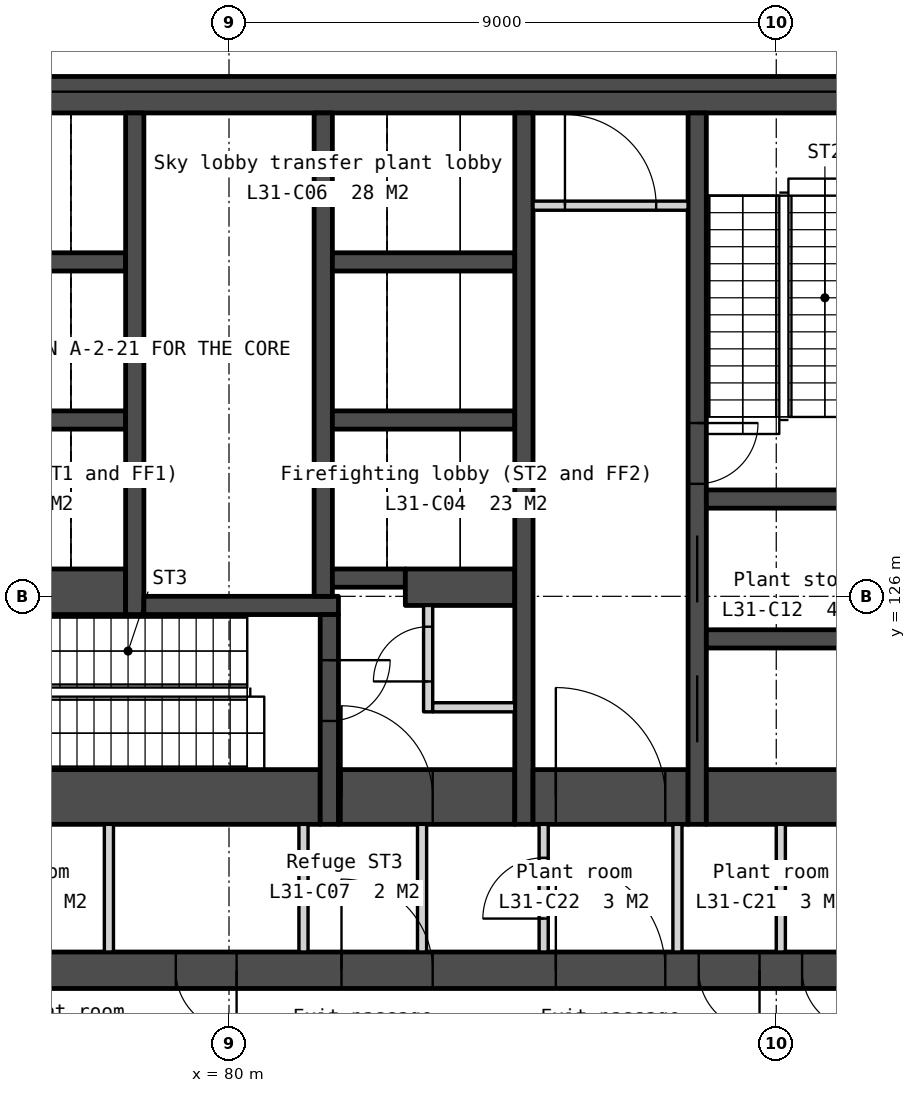
"""IFC4 building model, lengths in metres.
Left out: names, types, materials, properties, quantities, classifications, styles, units other than length and angle.
Written with IfcOpenShell. Run it as: python <this file> out.ifc"""

import sys

from ifc_helpers import new_model, si_unit, direction, frame, frame_2d, origin, place, context, subcontext, project, spatial, rectangle, extrude, element, fill, save


model = new_model("IFC4")
c1 = context("Model", 3, precision=1e-05, world=origin(), true_north=direction((0.0, 1.0)))
c2 = subcontext(c1, "Body", "Model", "MODEL_VIEW")
j1 = project(units=[si_unit("LENGTHUNIT", "METRE"), si_unit("PLANEANGLEUNIT", "RADIAN")], contexts=[c1])
p1 = place(None, origin())
s1 = spatial("IfcSite", under=j1, at=p1, CompositionType="ELEMENT")
p2 = place(p1, origin())
s2 = spatial("IfcBuilding", under=s1, at=p2, CompositionType="ELEMENT")
p3 = place(p2, frame((0.0, 0.0, 123.8)))
s3 = spatial("IfcBuildingStorey", under=s2, at=p3, CompositionType="ELEMENT", Elevation=123.8)
p4 = place(p3, frame((66.0, 134.25, 0.0), z_axis=(0.0, 0.0, 1.0), x_axis=(1.0, 0.0, 0.0)))
e1 = element("IfcWall", 1, at=p4, inside=s3, PredefinedType="SOLIDWALL", context=c2, shape_type="SweptSolid", body=[
    extrude(rectangle(XDim=28.0, YDim=0.6, at=frame_2d((14.0, 0.0))), origin(), (0.0, 0.0, 1.0), 4.35),
])
p5 = place(p3, frame((66.0, 119.85, 0.0), z_axis=(0.0, 0.0, 1.0), x_axis=(1.0, 0.0, 0.0)))
e2 = element("IfcWall", 2, at=p5, inside=s3, PredefinedType="SOLIDWALL", context=c2, shape_type="SweptSolid", body=[
    extrude(rectangle(XDim=28.0, YDim=0.6, at=frame_2d((14.0, 0.0))), origin(), (0.0, 0.0, 1.0), 4.35),
])
p6 = place(p5, frame((6.825, 0.0, 0.0)))
e3 = element("IfcOpeningElement", 3, at=p6, cuts=e2, PredefinedType="OPENING", context=c2, shape_type="SweptSolid", body=[
    extrude(rectangle(XDim=1.8, YDim=2.1, at=frame_2d((0.9, 1.05))), frame((0.0, 0.31, 0.0), z_axis=(0.0, -1.0, 0.0), x_axis=(1.0, 0.0, 0.0)), (0.0, 0.0, 1.0), 0.62),
])
p7 = place(p5, frame((15.85, 0.0, 0.0)))
e4 = element("IfcOpeningElement", 4, at=p7, cuts=e2, PredefinedType="OPENING", context=c2, shape_type="SweptSolid", body=[
    extrude(rectangle(XDim=1.5, YDim=2.1, at=frame_2d((0.75, 1.05))), frame((0.0, 0.31, 0.0), z_axis=(0.0, -1.0, 0.0), x_axis=(1.0, 0.0, 0.0)), (0.0, 0.0, 1.0), 0.62),
])
p8 = place(p5, frame((19.375, 0.0, 0.0)))
e5 = element("IfcOpeningElement", 5, at=p8, cuts=e2, PredefinedType="OPENING", context=c2, shape_type="SweptSolid", body=[
    extrude(rectangle(XDim=1.8, YDim=2.1, at=frame_2d((0.9, 1.05))), frame((0.0, 0.31, 0.0), z_axis=(0.0, -1.0, 0.0), x_axis=(1.0, 0.0, 0.0)), (0.0, 0.0, 1.0), 0.62),
])
p9 = place(p5, frame((4.425, 0.0, 0.0)))
e6 = element("IfcOpeningElement", 6, at=p9, cuts=e2, PredefinedType="OPENING", context=c2, shape_type="SweptSolid", body=[
    extrude(rectangle(XDim=1.0, YDim=2.1, at=frame_2d((0.5, 1.05))), frame((0.0, 0.31, 0.0), z_axis=(0.0, -1.0, 0.0), x_axis=(1.0, 0.0, 0.0)), (0.0, 0.0, 1.0), 0.62),
])
p10 = place(p5, frame((9.925, 0.0, 0.0)))
e7 = element("IfcOpeningElement", 7, at=p10, cuts=e2, PredefinedType="OPENING", context=c2, shape_type="SweptSolid", body=[
    extrude(rectangle(XDim=1.0, YDim=2.1, at=frame_2d((0.5, 1.05))), frame((0.0, 0.31, 0.0), z_axis=(0.0, -1.0, 0.0), x_axis=(1.0, 0.0, 0.0)), (0.0, 0.0, 1.0), 0.62),
])
p11 = place(p5, frame((13.125, 0.0, 0.0)))
e8 = element("IfcOpeningElement", 8, at=p11, cuts=e2, PredefinedType="OPENING", context=c2, shape_type="SweptSolid", body=[
    extrude(rectangle(XDim=1.0, YDim=2.1, at=frame_2d((0.5, 1.05))), frame((0.0, 0.31, 0.0), z_axis=(0.0, -1.0, 0.0), x_axis=(1.0, 0.0, 0.0)), (0.0, 0.0, 1.0), 0.62),
])
p12 = place(p5, frame((21.725, 0.0, 0.0)))
e9 = element("IfcOpeningElement", 9, at=p12, cuts=e2, PredefinedType="OPENING", context=c2, shape_type="SweptSolid", body=[
    extrude(rectangle(XDim=1.0, YDim=2.1, at=frame_2d((0.5, 1.05))), frame((0.0, 0.31, 0.0), z_axis=(0.0, -1.0, 0.0), x_axis=(1.0, 0.0, 0.0)), (0.0, 0.0, 1.0), 0.62),
])
p13 = place(p5, frame((23.425, 0.0, 0.0)))
e10 = element("IfcOpeningElement", 10, at=p13, cuts=e2, PredefinedType="OPENING", context=c2, shape_type="SweptSolid", body=[
    extrude(rectangle(XDim=1.0, YDim=2.1, at=frame_2d((0.5, 1.05))), frame((0.0, 0.31, 0.0), z_axis=(0.0, -1.0, 0.0), x_axis=(1.0, 0.0, 0.0)), (0.0, 0.0, 1.0), 0.62),
])
for number, where, z_axis, x_axis in (
    (11, (75.3, 131.5, 0.0), (0.0, 0.0, 1.0), (1.0, 0.0, 0.0)),
    (12, (75.3, 128.9, 0.0), (0.0, 0.0, 1.0), (1.0, 0.0, 0.0)),
):
    element("IfcWall", number, at=place(p3, frame(where, z_axis=z_axis, x_axis=x_axis)), inside=s3, PredefinedType="SOLIDWALL", context=c2, shape_type="SweptSolid", body=[
        extrude(rectangle(XDim=3.0, YDim=0.3, at=frame_2d((1.5, 0.0))), origin(), (0.0, 0.0, 1.0), 4.35),
    ])
p14 = place(p3, frame((75.3, 126.075, 0.0), z_axis=(0.0, 0.0, 1.0), x_axis=(1.0, 0.0, 0.0)))
e13 = element("IfcWall", 13, at=p14, inside=s3, PredefinedType="SOLIDWALL", context=c2, shape_type="SweptSolid", body=[
    extrude(rectangle(XDim=3.0, YDim=0.75, at=frame_2d((1.5, 0.0))), origin(), (0.0, 0.0, 1.0), 4.35),
])
p15 = place(p3, frame((75.3, 122.7, 0.0), z_axis=(0.0, 0.0, 1.0), x_axis=(1.0, 0.0, 0.0)))
e14 = element("IfcWall", 14, at=p15, inside=s3, PredefinedType="SOLIDWALL", context=c2, shape_type="SweptSolid", body=[
    extrude(rectangle(XDim=6.2, YDim=0.9, at=frame_2d((3.1, 0.0))), origin(), (0.0, 0.0, 1.0), 4.35),
])
p16 = place(p3, frame((78.025, 122.25, 0.0), z_axis=(0.0, 0.0, 1.0), x_axis=(0.0, -1.0, 0.0)))
e15 = element("IfcWall", 15, at=p16, inside=s3, PredefinedType="PARTITIONING", context=c2, shape_type="SweptSolid", body=[
    extrude(rectangle(XDim=2.1, YDim=0.15, at=frame_2d((1.05, 0.0))), origin(), (0.0, 0.0, 1.0), 3.89),
])
p17 = place(p3, frame((78.45, 133.95, 0.0), z_axis=(0.0, 0.0, 1.0), x_axis=(0.0, -1.0, 0.0)))
e16 = element("IfcWall", 16, at=p17, inside=s3, PredefinedType="SOLIDWALL", context=c2, shape_type="SweptSolid", body=[
    extrude(rectangle(XDim=8.25, YDim=0.3, at=frame_2d((4.125, 0.0))), origin(), (0.0, 0.0, 1.0), 4.35),
])
p18 = place(p3, frame((78.6, 125.85, 0.0), z_axis=(0.0, 0.0, 1.0), x_axis=(1.0, 0.0, 0.0)))
e17 = element("IfcWall", 17, at=p18, inside=s3, PredefinedType="SOLIDWALL", context=c2, shape_type="SweptSolid", body=[
    extrude(rectangle(XDim=3.2, YDim=0.3, at=frame_2d((1.6, 0.0))), origin(), (0.0, 0.0, 1.0), 4.35),
])
p19 = place(p3, frame((81.225, 122.25, 0.0), z_axis=(0.0, 0.0, 1.0), x_axis=(0.0, -1.0, 0.0)))
e18 = element("IfcWall", 18, at=p19, inside=s3, PredefinedType="PARTITIONING", context=c2, shape_type="SweptSolid", body=[
    extrude(rectangle(XDim=2.1, YDim=0.15, at=frame_2d((1.05, 0.0))), origin(), (0.0, 0.0, 1.0), 3.89),
])
p20 = place(p3, frame((81.55, 133.95, 0.0), z_axis=(0.0, 0.0, 1.0), x_axis=(0.0, -1.0, 0.0)))
e19 = element("IfcWall", 19, at=p20, inside=s3, PredefinedType="SOLIDWALL", context=c2, shape_type="SweptSolid", body=[
    extrude(rectangle(XDim=7.95, YDim=0.3, at=frame_2d((3.975, 0.0))), origin(), (0.0, 0.0, 1.0), 4.35),
])
p21 = place(p3, frame((81.65, 125.7, 0.0), z_axis=(0.0, 0.0, 1.0), x_axis=(0.0, -1.0, 0.0)))
e20 = element("IfcWall", 20, at=p21, inside=s3, PredefinedType="SOLIDWALL", context=c2, shape_type="SweptSolid", body=[
    extrude(rectangle(XDim=3.45, YDim=0.3, at=frame_2d((1.725, 0.0))), origin(), (0.0, 0.0, 1.0), 4.35),
])
p22 = place(p21, frame((0.75, 0.0, 0.0)))
e21 = element("IfcOpeningElement", 21, at=p22, cuts=e20, PredefinedType="OPENING", context=c2, shape_type="SweptSolid", body=[
    extrude(rectangle(XDim=1.0, YDim=2.1, at=frame_2d((0.5, 1.05))), frame((0.0, 0.16, 0.0), z_axis=(0.0, -1.0, 0.0), x_axis=(1.0, 0.0, 0.0)), (0.0, 0.0, 1.0), 0.32),
])
for number, where, z_axis, x_axis in (
    (22, (81.7, 131.5, 0.0), (0.0, 0.0, 1.0), (1.0, 0.0, 0.0)),
    (23, (81.7, 128.9, 0.0), (0.0, 0.0, 1.0), (1.0, 0.0, 0.0)),
):
    element("IfcWall", number, at=place(p3, frame(where, z_axis=z_axis, x_axis=x_axis)), inside=s3, PredefinedType="SOLIDWALL", context=c2, shape_type="SweptSolid", body=[
        extrude(rectangle(XDim=3.0, YDim=0.3, at=frame_2d((1.5, 0.0))), origin(), (0.0, 0.0, 1.0), 4.35),
    ])
p23 = place(p3, frame((81.7, 126.3, 0.0), z_axis=(0.0, 0.0, 1.0), x_axis=(1.0, 0.0, 0.0)))
e24 = element("IfcWall", 24, at=p23, inside=s3, PredefinedType="SOLIDWALL", context=c2, shape_type="SweptSolid", body=[
    extrude(rectangle(XDim=1.2, YDim=0.3, at=frame_2d((0.6, 0.0))), origin(), (0.0, 0.0, 1.0), 4.35),
])
p24 = place(p3, frame((81.8, 122.7, 0.0), z_axis=(0.0, 0.0, 1.0), x_axis=(1.0, 0.0, 0.0)))
e25 = element("IfcWall", 25, at=p24, inside=s3, PredefinedType="SOLIDWALL", context=c2, shape_type="SweptSolid", body=[
    extrude(rectangle(XDim=2.9, YDim=0.9, at=frame_2d((1.45, 0.0))), origin(), (0.0, 0.0, 1.0), 4.35),
])
p25 = place(p24, frame((0.05, 0.0, 0.0)))
e26 = element("IfcOpeningElement", 26, at=p25, cuts=e25, PredefinedType="OPENING", context=c2, shape_type="SweptSolid", body=[
    extrude(rectangle(XDim=1.5, YDim=2.1, at=frame_2d((0.75, 1.05))), frame((0.0, 0.46, 0.0), z_axis=(0.0, -1.0, 0.0), x_axis=(1.0, 0.0, 0.0)), (0.0, 0.0, 1.0), 0.92),
])
p26 = place(p3, frame((82.9, 126.15, 0.0), z_axis=(0.0, 0.0, 1.0), x_axis=(1.0, 0.0, 0.0)))
e27 = element("IfcWall", 27, at=p26, inside=s3, PredefinedType="SOLIDWALL", context=c2, shape_type="SweptSolid", body=[
    extrude(rectangle(XDim=1.8, YDim=0.6, at=frame_2d((0.9, 0.0))), origin(), (0.0, 0.0, 1.0), 4.35),
])
p27 = place(p3, frame((83.175, 122.25, 0.0), z_axis=(0.0, 0.0, 1.0), x_axis=(0.0, -1.0, 0.0)))
e28 = element("IfcWall", 28, at=p27, inside=s3, PredefinedType="PARTITIONING", context=c2, shape_type="SweptSolid", body=[
    extrude(rectangle(XDim=2.1, YDim=0.15, at=frame_2d((1.05, 0.0))), origin(), (0.0, 0.0, 1.0), 3.89),
])
p28 = place(p3, frame((83.275, 125.85, 0.0), z_axis=(0.0, 0.0, 1.0), x_axis=(0.0, -1.0, 0.0)))
e29 = element("IfcWall", 29, at=p28, inside=s3, PredefinedType="PARTITIONING", context=c2, shape_type="SweptSolid", body=[
    extrude(rectangle(XDim=1.75, YDim=0.15, at=frame_2d((0.875, 0.0))), origin(), (0.0, 0.0, 1.0), 4.35),
])
p29 = place(p28, frame((0.35, 0.0, 0.0)))
e30 = element("IfcOpeningElement", 30, at=p29, cuts=e29, PredefinedType="OPENING", context=c2, shape_type="SweptSolid", body=[
    extrude(rectangle(XDim=0.9, YDim=2.1, at=frame_2d((0.45, 1.05))), frame((0.0, 0.085, 0.0), z_axis=(0.0, -1.0, 0.0), x_axis=(1.0, 0.0, 0.0)), (0.0, 0.0, 1.0), 0.17),
])
p30 = place(p3, frame((83.35, 124.175, 0.0), z_axis=(0.0, 0.0, 1.0), x_axis=(1.0, 0.0, 0.0)))
e31 = element("IfcWall", 31, at=p30, inside=s3, PredefinedType="PARTITIONING", context=c2, shape_type="SweptSolid", body=[
    extrude(rectangle(XDim=1.35, YDim=0.15, at=frame_2d((0.675, 0.0))), origin(), (0.0, 0.0, 1.0), 4.35),
])
p31 = place(p3, frame((84.85, 133.95, 0.0), z_axis=(0.0, 0.0, 1.0), x_axis=(0.0, -1.0, 0.0)))
e32 = element("IfcWall", 32, at=p31, inside=s3, PredefinedType="SOLIDWALL", context=c2, shape_type="SweptSolid", body=[
    extrude(rectangle(XDim=11.7, YDim=0.3, at=frame_2d((5.85, 0.0))), origin(), (0.0, 0.0, 1.0), 4.35),
])
p32 = place(p3, frame((85.0, 132.425, 0.0), z_axis=(0.0, 0.0, 1.0), x_axis=(1.0, 0.0, 0.0)))
e33 = element("IfcWall", 33, at=p32, inside=s3, PredefinedType="PARTITIONING", context=c2, shape_type="SweptSolid", body=[
    extrude(rectangle(XDim=2.55, YDim=0.15, at=frame_2d((1.275, 0.0))), origin(), (0.0, 0.0, 1.0), 4.35),
])
p33 = place(p32, frame((0.525, 0.0, 0.0)))
e34 = element("IfcOpeningElement", 34, at=p33, cuts=e33, PredefinedType="OPENING", context=c2, shape_type="SweptSolid", body=[
    extrude(rectangle(XDim=1.5, YDim=2.1, at=frame_2d((0.75, 1.05))), frame((0.0, 0.085, 0.0), z_axis=(0.0, -1.0, 0.0), x_axis=(1.0, 0.0, 0.0)), (0.0, 0.0, 1.0), 0.17),
])
p34 = place(p3, frame((85.0, 122.7, 0.0), z_axis=(0.0, 0.0, 1.0), x_axis=(1.0, 0.0, 0.0)))
e35 = element("IfcWall", 35, at=p34, inside=s3, PredefinedType="SOLIDWALL", context=c2, shape_type="SweptSolid", body=[
    extrude(rectangle(XDim=2.55, YDim=0.9, at=frame_2d((1.275, 0.0))), origin(), (0.0, 0.0, 1.0), 4.35),
])
p35 = place(p34, frame((0.375, 0.0, 0.0)))
e36 = element("IfcOpeningElement", 36, at=p35, cuts=e35, PredefinedType="OPENING", context=c2, shape_type="SweptSolid", body=[
    extrude(rectangle(XDim=1.8, YDim=2.1, at=frame_2d((0.9, 1.05))), frame((0.0, 0.46, 0.0), z_axis=(0.0, -1.0, 0.0), x_axis=(1.0, 0.0, 0.0)), (0.0, 0.0, 1.0), 0.92),
])
p36 = place(p3, frame((85.175, 122.25, 0.0), z_axis=(0.0, 0.0, 1.0), x_axis=(0.0, -1.0, 0.0)))
e37 = element("IfcWall", 37, at=p36, inside=s3, PredefinedType="PARTITIONING", context=c2, shape_type="SweptSolid", body=[
    extrude(rectangle(XDim=2.1, YDim=0.15, at=frame_2d((1.05, 0.0))), origin(), (0.0, 0.0, 1.0), 3.89),
])
p37 = place(p36, frame((0.55, 0.0, 0.0)))
e38 = element("IfcOpeningElement", 38, at=p37, cuts=e37, PredefinedType="OPENING", context=c2, shape_type="SweptSolid", body=[
    extrude(rectangle(XDim=1.0, YDim=2.1, at=frame_2d((0.5, 1.05))), frame((0.0, 0.085, 0.0), z_axis=(0.0, -1.0, 0.0), x_axis=(1.0, 0.0, 0.0)), (0.0, 0.0, 1.0), 0.17),
])
p38 = place(p3, frame((87.375, 122.25, 0.0), z_axis=(0.0, 0.0, 1.0), x_axis=(0.0, -1.0, 0.0)))
e39 = element("IfcWall", 39, at=p38, inside=s3, PredefinedType="PARTITIONING", context=c2, shape_type="SweptSolid", body=[
    extrude(rectangle(XDim=2.1, YDim=0.15, at=frame_2d((1.05, 0.0))), origin(), (0.0, 0.0, 1.0), 3.89),
])
p39 = place(p3, frame((87.7, 133.95, 0.0), z_axis=(0.0, 0.0, 1.0), x_axis=(0.0, -1.0, 0.0)))
e40 = element("IfcWall", 40, at=p39, inside=s3, PredefinedType="SOLIDWALL", context=c2, shape_type="SweptSolid", body=[
    extrude(rectangle(XDim=11.7, YDim=0.3, at=frame_2d((5.85, 0.0))), origin(), (0.0, 0.0, 1.0), 4.35),
])
p40 = place(p39, frame((6.95, 0.0, 0.0)))
e41 = element("IfcOpeningElement", 41, at=p40, cuts=e40, PredefinedType="OPENING", context=c2, shape_type="SweptSolid", body=[
    extrude(rectangle(XDim=1.1, YDim=2.1, at=frame_2d((0.55, 1.05))), frame((0.0, 0.16, 0.0), z_axis=(0.0, -1.0, 0.0), x_axis=(1.0, 0.0, 0.0)), (0.0, 0.0, 1.0), 0.32),
])
p41 = place(p39, frame((5.1, 0.0, 0.0)))
e42 = element("IfcOpeningElement", 42, at=p41, cuts=e40, PredefinedType="OPENING", context=c2, shape_type="SweptSolid", body=[
    extrude(rectangle(XDim=1.0, YDim=2.1, at=frame_2d((0.5, 1.05))), frame((0.0, 0.16, 0.0), z_axis=(0.0, -1.0, 0.0), x_axis=(1.0, 0.0, 0.0)), (0.0, 0.0, 1.0), 0.32),
])
p42 = place(p39, frame((9.25, 0.0, 0.0)))
e43 = element("IfcOpeningElement", 43, at=p42, cuts=e40, PredefinedType="OPENING", context=c2, shape_type="SweptSolid", body=[
    extrude(rectangle(XDim=1.1, YDim=2.1, at=frame_2d((0.55, 1.05))), frame((0.0, 0.16, 0.0), z_axis=(0.0, -1.0, 0.0), x_axis=(1.0, 0.0, 0.0)), (0.0, 0.0, 1.0), 0.32),
])
for number, where, z_axis, x_axis in (
    (44, (87.85, 127.6, 0.0), (0.0, 0.0, 1.0), (1.0, 0.0, 0.0)),
    (45, (87.85, 125.3, 0.0), (0.0, 0.0, 1.0), (1.0, 0.0, 0.0)),
):
    element("IfcWall", number, at=place(p3, frame(where, z_axis=z_axis, x_axis=x_axis)), inside=s3, PredefinedType="SOLIDWALL", context=c2, shape_type="SweptSolid", body=[
        extrude(rectangle(XDim=2.55, YDim=0.3, at=frame_2d((1.275, 0.0))), origin(), (0.0, 0.0, 1.0), 4.35),
    ])
p43 = place(p3, frame((87.85, 122.7, 0.0), z_axis=(0.0, 0.0, 1.0), x_axis=(1.0, 0.0, 0.0)))
e46 = element("IfcWall", 46, at=p43, inside=s3, PredefinedType="SOLIDWALL", context=c2, shape_type="SweptSolid", body=[
    extrude(rectangle(XDim=2.55, YDim=0.9, at=frame_2d((1.275, 0.0))), origin(), (0.0, 0.0, 1.0), 4.35),
])
p44 = place(p3, frame((89.075, 122.25, 0.0), z_axis=(0.0, 0.0, 1.0), x_axis=(0.0, -1.0, 0.0)))
e47 = element("IfcWall", 47, at=p44, inside=s3, PredefinedType="PARTITIONING", context=c2, shape_type="SweptSolid", body=[
    extrude(rectangle(XDim=2.1, YDim=0.15, at=frame_2d((1.05, 0.0))), origin(), (0.0, 0.0, 1.0), 3.672),
])
p45 = place(p40, origin())
e48 = element("IfcDoor", 48, at=p45, inside=s3, OperationType="SLIDING_TO_LEFT", PredefinedType="DOOR", context=c2, shape_type="SweptSolid", body=[
    extrude(rectangle(XDim=1.1, YDim=2.1, at=frame_2d((0.55, 1.05))), frame((0.0, 0.025, 0.0), z_axis=(0.0, -1.0, 0.0), x_axis=(1.0, 0.0, 0.0)), (0.0, 0.0, 1.0), 0.05),
])
fill(e41, e48)
p46 = place(p35, origin())
e49 = element("IfcDoor", 49, at=p46, inside=s3, OperationType="DOUBLE_DOOR_DOUBLE_SWING", PredefinedType="DOOR", context=c2, shape_type="SweptSolid", body=[
    extrude(rectangle(XDim=1.8, YDim=2.1, at=frame_2d((0.9, 1.05))), frame((0.0, 0.025, 0.0), z_axis=(0.0, -1.0, 0.0), x_axis=(1.0, 0.0, 0.0)), (0.0, 0.0, 1.0), 0.05),
])
fill(e36, e49)
p47 = place(p25, origin())
e50 = element("IfcDoor", 50, at=p47, inside=s3, OperationType="DOUBLE_DOOR_DOUBLE_SWING", PredefinedType="DOOR", context=c2, shape_type="SweptSolid", body=[
    extrude(rectangle(XDim=1.5, YDim=2.1, at=frame_2d((0.75, 1.05))), frame((0.0, 0.025, 0.0), z_axis=(0.0, -1.0, 0.0), x_axis=(1.0, 0.0, 0.0)), (0.0, 0.0, 1.0), 0.05),
])
fill(e26, e50)
p48 = place(p7, origin())
e51 = element("IfcDoor", 51, at=p48, inside=s3, OperationType="DOUBLE_DOOR_DOUBLE_SWING", PredefinedType="DOOR", context=c2, shape_type="SweptSolid", body=[
    extrude(rectangle(XDim=1.5, YDim=2.1, at=frame_2d((0.75, 1.05))), frame((0.0, 0.025, 0.0), z_axis=(0.0, -1.0, 0.0), x_axis=(1.0, 0.0, 0.0)), (0.0, 0.0, 1.0), 0.05),
])
fill(e4, e51)
p49 = place(p8, origin())
e52 = element("IfcDoor", 52, at=p49, inside=s3, OperationType="DOUBLE_DOOR_DOUBLE_SWING", PredefinedType="DOOR", context=c2, shape_type="SweptSolid", body=[
    extrude(rectangle(XDim=1.8, YDim=2.1, at=frame_2d((0.9, 1.05))), frame((0.0, 0.025, 0.0), z_axis=(0.0, -1.0, 0.0), x_axis=(1.0, 0.0, 0.0)), (0.0, 0.0, 1.0), 0.05),
])
fill(e5, e52)
p50 = place(p29, origin())
e53 = element("IfcDoor", 53, at=p50, inside=s3, OperationType="SINGLE_SWING_RIGHT", PredefinedType="DOOR", context=c2, shape_type="SweptSolid", body=[
    extrude(rectangle(XDim=0.9, YDim=2.1, at=frame_2d((0.45, 1.05))), frame((0.0, 0.025, 0.0), z_axis=(0.0, -1.0, 0.0), x_axis=(1.0, 0.0, 0.0)), (0.0, 0.0, 1.0), 0.05),
])
fill(e30, e53)
p51 = place(p33, origin())
e54 = element("IfcDoor", 54, at=p51, inside=s3, OperationType="DOUBLE_DOOR_DOUBLE_SWING", PredefinedType="DOOR", context=c2, shape_type="SweptSolid", body=[
    extrude(rectangle(XDim=1.5, YDim=2.1, at=frame_2d((0.75, 1.05))), frame((0.0, 0.025, 0.0), z_axis=(0.0, -1.0, 0.0), x_axis=(1.0, 0.0, 0.0)), (0.0, 0.0, 1.0), 0.05),
])
fill(e34, e54)
p52 = place(p11, origin())
e55 = element("IfcDoor", 55, at=p52, inside=s3, OperationType="SINGLE_SWING_RIGHT", PredefinedType="DOOR", context=c2, shape_type="SweptSolid", body=[
    extrude(rectangle(XDim=1.0, YDim=2.1, at=frame_2d((0.5, 1.05))), frame((0.0, 0.025, 0.0), z_axis=(0.0, -1.0, 0.0), x_axis=(1.0, 0.0, 0.0)), (0.0, 0.0, 1.0), 0.05),
])
fill(e8, e55)
p53 = place(p37, origin())
e56 = element("IfcDoor", 56, at=p53, inside=s3, OperationType="SINGLE_SWING_RIGHT", PredefinedType="DOOR", context=c2, shape_type="SweptSolid", body=[
    extrude(rectangle(XDim=1.0, YDim=2.1, at=frame_2d((0.5, 1.05))), frame((0.0, 0.025, 0.0), z_axis=(0.0, -1.0, 0.0), x_axis=(1.0, 0.0, 0.0)), (0.0, 0.0, 1.0), 0.05),
])
fill(e38, e56)
p54 = place(p12, origin())
e57 = element("IfcDoor", 57, at=p54, inside=s3, OperationType="SINGLE_SWING_RIGHT", PredefinedType="DOOR", context=c2, shape_type="SweptSolid", body=[
    extrude(rectangle(XDim=1.0, YDim=2.1, at=frame_2d((0.5, 1.05))), frame((0.0, 0.025, 0.0), z_axis=(0.0, -1.0, 0.0), x_axis=(1.0, 0.0, 0.0)), (0.0, 0.0, 1.0), 0.05),
])
fill(e9, e57)
p55 = place(p13, origin())
e58 = element("IfcDoor", 58, at=p55, inside=s3, OperationType="SINGLE_SWING_RIGHT", PredefinedType="DOOR", context=c2, shape_type="SweptSolid", body=[
    extrude(rectangle(XDim=1.0, YDim=2.1, at=frame_2d((0.5, 1.05))), frame((0.0, 0.025, 0.0), z_axis=(0.0, -1.0, 0.0), x_axis=(1.0, 0.0, 0.0)), (0.0, 0.0, 1.0), 0.05),
])
fill(e10, e58)
p56 = place(p41, origin())
e59 = element("IfcDoor", 59, at=p56, inside=s3, OperationType="SINGLE_SWING_LEFT", PredefinedType="DOOR", context=c2, shape_type="SweptSolid", body=[
    extrude(rectangle(XDim=1.0, YDim=2.1, at=frame_2d((0.5, 1.05))), frame((0.0, 0.025, 0.0), z_axis=(0.0, -1.0, 0.0), x_axis=(1.0, 0.0, 0.0)), (0.0, 0.0, 1.0), 0.05),
])
fill(e42, e59)
p57 = place(p22, origin())
e60 = element("IfcDoor", 60, at=p57, inside=s3, OperationType="SINGLE_SWING_LEFT", PredefinedType="DOOR", context=c2, shape_type="SweptSolid", body=[
    extrude(rectangle(XDim=1.0, YDim=2.1, at=frame_2d((0.5, 1.05))), frame((0.0, 0.025, 0.0), z_axis=(0.0, -1.0, 0.0), x_axis=(1.0, 0.0, 0.0)), (0.0, 0.0, 1.0), 0.05),
])
fill(e21, e60)
p58 = place(p42, origin())
e61 = element("IfcDoor", 61, at=p58, inside=s3, OperationType="SLIDING_TO_LEFT", PredefinedType="DOOR", context=c2, shape_type="SweptSolid", body=[
    extrude(rectangle(XDim=1.1, YDim=2.1, at=frame_2d((0.55, 1.05))), frame((0.0, 0.025, 0.0), z_axis=(0.0, -1.0, 0.0), x_axis=(1.0, 0.0, 0.0)), (0.0, 0.0, 1.0), 0.05),
])
fill(e43, e61)
save(model, sys.argv[1])
